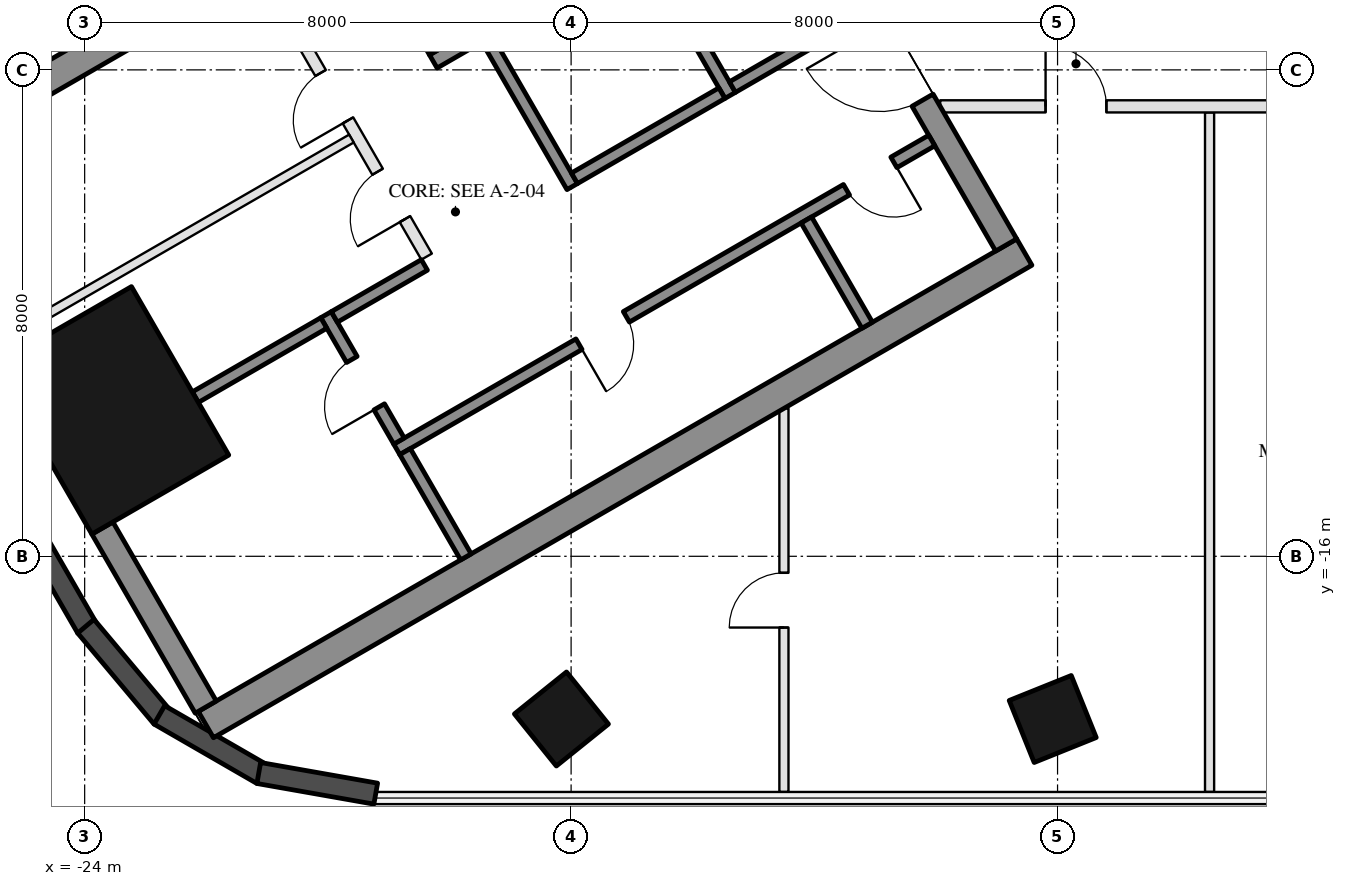
"""IFC4 building model, lengths in metres.
Left out: names, types, materials, properties, quantities, classifications, styles, units other than length and angle.
Written with IfcOpenShell. Run it as: python <this file> out.ifc"""

import sys

from ifc_helpers import new_model, si_unit, direction, frame, frame_2d, origin, origin_2d, place, context, subcontext, project, spatial, rectangle, hollow_rectangle, extrude, boolean, halfspace, element, fill, save


model = new_model("IFC4")
c1 = context("Model", 3, precision=1e-05, world=origin(), true_north=direction((0.0, 1.0)))
c2 = subcontext(c1, "Body", "Model", "MODEL_VIEW")
j1 = project(units=[si_unit("LENGTHUNIT", "METRE"), si_unit("PLANEANGLEUNIT", "RADIAN")], contexts=[c1])
p1 = place(None, origin())
s1 = spatial("IfcSite", under=j1, at=p1, CompositionType="ELEMENT")
p2 = place(p1, origin())
s2 = spatial("IfcBuilding", under=s1, at=p2, CompositionType="ELEMENT")
p3 = place(p2, frame((0.0, 0.0, 23.5)))
s3 = spatial("IfcBuildingStorey", under=s2, at=p3, CompositionType="ELEMENT", Elevation=23.5)
p4 = place(p3, frame((-16.159, -18.676, 0.0), z_axis=(0.041995221245, 0.052226075608, 0.997751892215), x_axis=(-0.999116711053, 0.000712967272, 0.042015346876)))
e1 = element("IfcColumn", 1, at=p4, inside=s3, PredefinedType="COLUMN", context=c2, shape_type="SweptSolid", body=[
    boolean("DIFFERENCE", boolean("DIFFERENCE", extrude(hollow_rectangle(XDim=1.1, YDim=1.1, WallThickness=0.05, at=origin_2d()), origin(), (0.0, 0.0, 1.0), 5.011), halfspace(frame((0.0, 0.0, 0.017), z_axis=(0.0, 0.0, 1.0), x_axis=(1.0, 0.0, 0.0)), True)), halfspace(frame((0.0, 0.0, 4.999), z_axis=(0.0, 0.0, 1.0), x_axis=(1.0, 0.0, 0.0)), False)),
])
p5 = place(p3, frame((-8.08, -18.676, 0.0), z_axis=(0.021060240181, 0.052260596004, 0.998411386348), x_axis=(-0.999778208433, 0.001085815533, 0.021032235927)))
e2 = element("IfcColumn", 2, at=p5, inside=s3, PredefinedType="COLUMN", context=c2, shape_type="SweptSolid", body=[
    boolean("DIFFERENCE", boolean("DIFFERENCE", extrude(hollow_rectangle(XDim=1.1, YDim=1.1, WallThickness=0.05, at=origin_2d()), origin(), (0.0, 0.0, 1.0), 5.008), halfspace(frame((0.0, 0.0, 0.014), z_axis=(0.0, 0.0, 1.0), x_axis=(1.0, 0.0, 0.0)), True)), halfspace(frame((0.0, 0.0, 4.997), z_axis=(0.0, 0.0, 1.0), x_axis=(1.0, 0.0, 0.0)), False)),
])
p6 = place(p3, frame((-23.556, -13.6, 0.0), z_axis=(0.0, 0.0, 1.0), x_axis=(-0.5, 0.866025403784, 0.0)))
e3 = element("IfcColumn", 3, at=p6, inside=s3, PredefinedType="COLUMN", context=c2, shape_type="SweptSolid", body=[
    extrude(hollow_rectangle(XDim=3.2, YDim=2.6, WallThickness=0.08, at=origin_2d()), origin(), (0.0, 0.0, 1.0), 5.0),
])
p7 = place(p3, frame((-26.856, -12.165, 0.0), z_axis=(0.0, 0.0, 1.0), x_axis=(0.500009758026, -0.866019769912, 0.0)))
e4 = element("IfcWall", 4, at=p7, inside=s3, PredefinedType="SOLIDWALL", context=c2, shape_type="SweptSolid", body=[
    extrude(rectangle(XDim=5.787, YDim=0.35, at=frame_2d((2.893, 0.0))), origin(), (0.0, 0.0, 1.0), 4.7),
])
for number, where, z_axis, x_axis in (
    (5, (-23.981, -17.151, 0.0), (0.0, 0.0, 1.0), (0.643, -0.766, 0.0)),
    (6, (-22.771, -18.608, 0.0), (0.0, 0.0, 1.0), (0.866, -0.5, 0.0)),
    (7, (-21.137, -19.564, 0.0), (0.0, 0.0, 1.0), (0.985, -0.174, 0.0)),
):
    element("IfcWall", number, at=place(p3, frame(where, z_axis=z_axis, x_axis=x_axis)), inside=s3, PredefinedType="SOLIDWALL", context=c2, shape_type="SweptSolid", body=[
        extrude(rectangle(XDim=1.954, YDim=0.35, at=frame_2d((0.977, 0.0))), origin(), (0.0, 0.0, 1.0), 4.7),
    ])
for number, where, z_axis, x_axis in (
    (8, (-13.797, -1.903, 0.0), (0.0, 0.0, 1.0), (-0.866, -0.5, 0.0)),
    (9, (-8.547, -10.997, 0.0), (0.0, 0.0, 1.0), (-0.866, -0.5, 0.0)),
):
    element("IfcWall", number, at=place(p3, frame(where, z_axis=z_axis, x_axis=x_axis)), inside=s3, PredefinedType="SHEAR", context=c2, shape_type="SweptSolid", body=[
        extrude(rectangle(XDim=15.542, YDim=0.5, at=frame_2d((7.771, 0.0))), origin(), (0.0, 0.0, 1.0), 4.7),
    ])
p8 = place(p3, frame((-13.845, -2.22, 0.0), z_axis=(0.0, 0.0, 1.0), x_axis=(0.500004234368, -0.866022959057, 0.0)))
e10 = element("IfcWall", 10, at=p8, inside=s3, PredefinedType="SHEAR", context=c2, shape_type="SweptSolid", body=[
    extrude(rectangle(XDim=10.0, YDim=0.4, at=frame_2d((5.0, 0.0))), origin(), (0.0, 0.0, 1.0), 4.7),
])
p9 = place(p8, frame((3.55, 0.0, 0.0)))
e11 = element("IfcOpeningElement", 11, at=p9, cuts=e10, PredefinedType="OPENING", context=c2, shape_type="SweptSolid", body=[
    extrude(rectangle(XDim=1.1, YDim=2.1, at=frame_2d((0.55, 1.05))), frame((0.0, 0.21, 0.0), z_axis=(0.0, -1.0, 0.0), x_axis=(1.0, 0.0, 0.0)), (0.0, 0.0, 1.0), 0.42),
])
p10 = place(p8, frame((5.85, 0.0, 0.0)))
e12 = element("IfcOpeningElement", 12, at=p10, cuts=e10, PredefinedType="OPENING", context=c2, shape_type="SweptSolid", body=[
    extrude(rectangle(XDim=1.4, YDim=2.1, at=frame_2d((0.7, 1.05))), frame((0.0, 0.21, 0.0), z_axis=(0.0, -1.0, 0.0), x_axis=(1.0, 0.0, 0.0)), (0.0, 0.0, 1.0), 0.42),
])
p11 = place(p3, frame((-23.708, -15.536, 0.0), z_axis=(0.0, 0.0, 1.0), x_axis=(0.500008388397, -0.866020560687, 0.0)))
e13 = element("IfcWall", 13, at=p11, inside=s3, PredefinedType="SHEAR", context=c2, shape_type="SweptSolid", body=[
    extrude(rectangle(XDim=3.4, YDim=0.4, at=frame_2d((1.7, 0.0))), origin(), (0.0, 0.0, 1.0), 4.7),
])
p12 = place(p3, frame((-12.681, -4.636, 0.0), z_axis=(0.0, 0.0, 1.0), x_axis=(-0.866021702275, -0.500006411147, 0.0)))
e14 = element("IfcWall", 14, at=p12, inside=s3, PredefinedType="SHEAR", context=c2, shape_type="SweptSolid", body=[
    extrude(rectangle(XDim=6.45, YDim=0.25, at=frame_2d((3.225, 0.0))), origin(), (0.0, 0.0, 1.0), 4.7),
])
p13 = place(p12, frame((0.3, 0.0, 0.0)))
e15 = element("IfcOpeningElement", 15, at=p13, cuts=e14, PredefinedType="OPENING", context=c2, shape_type="SweptSolid", body=[
    extrude(rectangle(XDim=1.0, YDim=2.1, at=frame_2d((0.5, 1.05))), frame((0.0, 0.135, 0.0), z_axis=(0.0, -1.0, 0.0), x_axis=(1.0, 0.0, 0.0)), (0.0, 0.0, 1.0), 0.27),
])
p14 = place(p3, frame((-19.496, -5.482, 0.0), z_axis=(0.0, 0.0, 1.0), x_axis=(0.499990435942, -0.866030925526, 0.0)))
e16 = element("IfcWall", 16, at=p14, inside=s3, PredefinedType="SHEAR", context=c2, shape_type="SweptSolid", body=[
    extrude(rectangle(XDim=2.55, YDim=0.25, at=frame_2d((1.275, 0.0))), origin(), (0.0, 0.0, 1.0), 4.7),
])
p15 = place(p3, frame((-17.381, -7.495, 0.0), z_axis=(0.0, 0.0, 1.0), x_axis=(0.500011755427, -0.866018616679, 0.0)))
e17 = element("IfcWall", 17, at=p15, inside=s3, PredefinedType="SHEAR", context=c2, shape_type="SweptSolid", body=[
    extrude(rectangle(XDim=2.8, YDim=0.2, at=frame_2d((1.4, 0.0))), origin(), (0.0, 0.0, 1.0), 4.7),
])
p16 = place(p3, frame((-14.783, -5.995, 0.0), z_axis=(0.0, 0.0, 1.0), x_axis=(0.49994636267, -0.866056369097, 0.0)))
e18 = element("IfcWall", 18, at=p16, inside=s3, PredefinedType="SHEAR", context=c2, shape_type="SweptSolid", body=[
    extrude(rectangle(XDim=2.8, YDim=0.2, at=frame_2d((1.4, 0.0))), origin(), (0.0, 0.0, 1.0), 4.7),
])
p17 = place(p16, frame((0.7, 0.0, 0.0)))
e19 = element("IfcOpeningElement", 19, at=p17, cuts=e18, PredefinedType="OPENING", context=c2, shape_type="SweptSolid", body=[
    extrude(rectangle(XDim=1.2, YDim=2.1, at=frame_2d((0.6, 1.05))), frame((0.0, 0.11, 0.0), z_axis=(0.0, -1.0, 0.0), x_axis=(1.0, 0.0, 0.0)), (0.0, 0.0, 1.0), 0.22),
])
p18 = place(p3, frame((-13.52, -8.383, 0.0), z_axis=(0.0, 0.0, 1.0), x_axis=(-0.866034573852, -0.49998411664, 0.0)))
e20 = element("IfcWall", 20, at=p18, inside=s3, PredefinedType="SHEAR", context=c2, shape_type="SweptSolid", body=[
    extrude(rectangle(XDim=2.8, YDim=0.2, at=frame_2d((1.4, 0.0))), origin(), (0.0, 0.0, 1.0), 4.7),
])
p19 = place(p3, frame((-11.268, -7.083, 0.0), z_axis=(0.0, 0.0, 1.0), x_axis=(-0.866050077142, -0.499957262057, 0.0)))
e21 = element("IfcWall", 21, at=p19, inside=s3, PredefinedType="SHEAR", context=c2, shape_type="SweptSolid", body=[
    extrude(rectangle(XDim=2.4, YDim=0.2, at=frame_2d((1.2, 0.0))), origin(), (0.0, 0.0, 1.0), 4.7),
])
p20 = place(p3, frame((-10.068, -9.162, 0.0), z_axis=(0.0, 0.0, 1.0), x_axis=(-0.866032725843, -0.499987317609, 0.0)))
e22 = element("IfcWall", 22, at=p20, inside=s3, PredefinedType="SHEAR", context=c2, shape_type="SweptSolid", body=[
    extrude(rectangle(XDim=10.16, YDim=0.2, at=frame_2d((5.08, 0.0))), origin(), (0.0, 0.0, 1.0), 4.7),
])
p21 = place(p20, frame((0.72, 0.0, 0.0)))
e23 = element("IfcOpeningElement", 23, at=p21, cuts=e22, PredefinedType="OPENING", context=c2, shape_type="SweptSolid", body=[
    extrude(rectangle(XDim=0.9, YDim=2.1, at=frame_2d((0.45, 1.05))), frame((0.0, 0.11, 0.0), z_axis=(0.0, -1.0, 0.0), x_axis=(1.0, 0.0, 0.0)), (0.0, 0.0, 1.0), 0.22),
])
p22 = place(p20, frame((5.8, 0.0, 0.0)))
e24 = element("IfcOpeningElement", 24, at=p22, cuts=e22, PredefinedType="OPENING", context=c2, shape_type="SweptSolid", body=[
    extrude(rectangle(XDim=0.9, YDim=2.1, at=frame_2d((0.45, 1.05))), frame((0.0, 0.11, 0.0), z_axis=(0.0, -1.0, 0.0), x_axis=(1.0, 0.0, 0.0)), (0.0, 0.0, 1.0), 0.22),
])
p23 = place(p3, frame((-20.031, -12.026, 0.0), z_axis=(0.0, 0.0, 1.0), x_axis=(0.500033551112, -0.866006032174, 0.0)))
e25 = element("IfcWall", 25, at=p23, inside=s3, PredefinedType="SHEAR", context=c2, shape_type="SweptSolid", body=[
    extrude(rectangle(XDim=2.4, YDim=0.2, at=frame_2d((1.2, 0.0))), origin(), (0.0, 0.0, 1.0), 4.7),
])
p24 = place(p23, frame((0.85, 0.0, 0.0)))
e26 = element("IfcOpeningElement", 26, at=p24, cuts=e25, PredefinedType="OPENING", context=c2, shape_type="SweptSolid", body=[
    extrude(rectangle(XDim=0.9, YDim=2.1, at=frame_2d((0.45, 1.05))), frame((0.0, 0.11, 0.0), z_axis=(0.0, -1.0, 0.0), x_axis=(1.0, 0.0, 0.0)), (0.0, 0.0, 1.0), 0.22),
])
p25 = place(p3, frame((-18.413, -11.208, 0.0), z_axis=(0.0, 0.0, 1.0), x_axis=(-0.866038183914, -0.499977863513, 0.0)))
e27 = element("IfcWall", 27, at=p25, inside=s3, PredefinedType="SHEAR", context=c2, shape_type="SweptSolid", body=[
    extrude(rectangle(XDim=1.71, YDim=0.2, at=frame_2d((0.855, 0.0))), origin(), (0.0, 0.0, 1.0), 4.7),
])
for number, where, z_axis, x_axis in (
    (28, (-12.131, -10.468, 0.0), (0.0, 0.0, 1.0), (0.5, -0.866, 0.0)),
    (29, (-18.73, -14.278, 0.0), (0.0, 0.0, 1.0), (0.5, -0.866, 0.0)),
):
    element("IfcWall", number, at=place(p3, frame(where, z_axis=z_axis, x_axis=x_axis)), inside=s3, PredefinedType="SHEAR", context=c2, shape_type="SweptSolid", body=[
        extrude(rectangle(XDim=2.0, YDim=0.2, at=frame_2d((1.0, 0.0))), origin(), (0.0, 0.0, 1.0), 4.7),
    ])
p26 = place(p3, frame((-20.067, -12.163, 0.0), z_axis=(0.0, 0.0, 1.0), x_axis=(-0.866048967903, -0.499959183527, 0.0)))
e30 = element("IfcWall", 30, at=p26, inside=s3, PredefinedType="SHEAR", context=c2, shape_type="SweptSolid", body=[
    extrude(rectangle(XDim=2.44, YDim=0.2, at=frame_2d((1.22, 0.0))), origin(), (0.0, 0.0, 1.0), 4.7),
])
p27 = place(p3, frame((-21.076, -6.395, 0.0), z_axis=(0.0, 0.0, 1.0), x_axis=(0.50001468107, -0.866016927499, 0.0)))
e31 = element("IfcWall", 31, at=p27, inside=s3, PredefinedType="PARTITIONING", context=c2, shape_type="SweptSolid", body=[
    extrude(rectangle(XDim=5.4, YDim=0.2, at=frame_2d((2.7, 0.0))), origin(), (0.0, 0.0, 1.0), 4.7),
])
p28 = place(p27, frame((1.913, 0.0, 0.0)))
e32 = element("IfcOpeningElement", 32, at=p28, cuts=e31, PredefinedType="OPENING", context=c2, shape_type="SweptSolid", body=[
    extrude(rectangle(XDim=0.9, YDim=2.1, at=frame_2d((0.45, 1.05))), frame((0.0, 0.11, 0.0), z_axis=(0.0, -1.0, 0.0), x_axis=(1.0, 0.0, 0.0)), (0.0, 0.0, 1.0), 0.22),
])
p29 = place(p27, frame((3.788, 0.0, 0.0)))
e33 = element("IfcOpeningElement", 33, at=p29, cuts=e31, PredefinedType="OPENING", context=c2, shape_type="SweptSolid", body=[
    extrude(rectangle(XDim=0.9, YDim=2.1, at=frame_2d((0.45, 1.05))), frame((0.0, 0.11, 0.0), z_axis=(0.0, -1.0, 0.0), x_axis=(1.0, 0.0, 0.0)), (0.0, 0.0, 1.0), 0.22),
])
p30 = place(p3, frame((-19.613, -9.13, 0.0), z_axis=(0.0, 0.0, 1.0), x_axis=(-0.866037242061, -0.499979494943, 0.0)))
e34 = element("IfcWall", 34, at=p30, inside=s3, PredefinedType="PARTITIONING", context=c2, shape_type="SweptSolid", body=[
    extrude(rectangle(XDim=6.55, YDim=0.15, at=frame_2d((3.275, 0.0))), origin(), (0.0, 0.0, 1.0), 4.7),
])
p31 = place(p3, frame((-12.5, -19.876, 0.0), z_axis=(0.0, 0.0, 1.0), x_axis=(0.0, 1.0, 0.0)))
e35 = element("IfcWall", 35, at=p31, inside=s3, PredefinedType="PARTITIONING", context=c2, shape_type="SweptSolid", body=[
    extrude(rectangle(XDim=6.308, YDim=0.15, at=frame_2d((3.154, 0.0))), origin(), (0.0, 0.0, 1.0), 4.1),
])
p32 = place(p31, frame((2.704, 0.0, 0.0)))
e36 = element("IfcOpeningElement", 36, at=p32, cuts=e35, PredefinedType="OPENING", context=c2, shape_type="SweptSolid", body=[
    extrude(rectangle(XDim=0.9, YDim=2.1, at=frame_2d((0.45, 1.05))), frame((0.0, 0.085, 0.0), z_axis=(0.0, -1.0, 0.0), x_axis=(1.0, 0.0, 0.0)), (0.0, 0.0, 1.0), 0.17),
])
p33 = place(p3, frame((-5.5, -19.876, 0.0), z_axis=(0.0, 0.0, 1.0), x_axis=(0.0, 1.0, 0.0)))
e37 = element("IfcWall", 37, at=p33, inside=s3, PredefinedType="PARTITIONING", context=c2, shape_type="SweptSolid", body=[
    extrude(rectangle(XDim=11.176, YDim=0.15, at=frame_2d((5.588, 0.0))), origin(), (0.0, 0.0, 1.0), 4.1),
])
p34 = place(p3, frame((-9.93, -8.6, 0.0), z_axis=(0.0, 0.0, 1.0), x_axis=(1.0, 0.0, 0.0)))
e38 = element("IfcWall", 38, at=p34, inside=s3, PredefinedType="PARTITIONING", context=c2, shape_type="SweptSolid", body=[
    extrude(rectangle(XDim=19.861, YDim=0.2, at=frame_2d((9.93, 0.0))), origin(), (0.0, 0.0, 1.0), 3.91),
])
p35 = place(p34, frame((1.734, 0.0, 0.0)))
e39 = element("IfcOpeningElement", 39, at=p35, cuts=e38, PredefinedType="OPENING", context=c2, shape_type="SweptSolid", body=[
    extrude(rectangle(XDim=1.0, YDim=2.1, at=frame_2d((0.5, 1.05))), frame((0.0, 0.11, 0.0), z_axis=(0.0, -1.0, 0.0), x_axis=(1.0, 0.0, 0.0)), (0.0, 0.0, 1.0), 0.22),
])
p36 = place(p34, frame((6.081, 0.0, 0.0)))
e40 = element("IfcOpeningElement", 40, at=p36, cuts=e38, PredefinedType="OPENING", context=c2, shape_type="SweptSolid", body=[
    extrude(rectangle(XDim=1.0, YDim=2.1, at=frame_2d((0.5, 1.05))), frame((0.0, 0.11, 0.0), z_axis=(0.0, -1.0, 0.0), x_axis=(1.0, 0.0, 0.0)), (0.0, 0.0, 1.0), 0.22),
])
p37 = place(p34, frame((10.831, 0.0, 0.0)))
e41 = element("IfcOpeningElement", 41, at=p37, cuts=e38, PredefinedType="OPENING", context=c2, shape_type="SweptSolid", body=[
    extrude(rectangle(XDim=1.0, YDim=2.1, at=frame_2d((0.5, 1.05))), frame((0.0, 0.11, 0.0), z_axis=(0.0, -1.0, 0.0), x_axis=(1.0, 0.0, 0.0)), (0.0, 0.0, 1.0), 0.22),
])
p38 = place(p34, frame((16.278, 0.0, 0.0)))
e42 = element("IfcOpeningElement", 42, at=p38, cuts=e38, PredefinedType="OPENING", context=c2, shape_type="SweptSolid", body=[
    extrude(rectangle(XDim=1.2, YDim=2.1, at=frame_2d((0.6, 1.05))), frame((0.0, 0.11, 0.0), z_axis=(0.0, -1.0, 0.0), x_axis=(1.0, 0.0, 0.0)), (0.0, 0.0, 1.0), 0.22),
])
p39 = place(p21, origin())
e43 = element("IfcDoor", 43, at=p39, inside=s3, OperationType="SINGLE_SWING_LEFT", PredefinedType="DOOR", context=c2, shape_type="SweptSolid", body=[
    extrude(rectangle(XDim=0.9, YDim=2.1, at=frame_2d((0.45, 1.05))), frame((0.0, 0.025, 0.0), z_axis=(0.0, -1.0, 0.0), x_axis=(1.0, 0.0, 0.0)), (0.0, 0.0, 1.0), 0.05),
])
fill(e23, e43)
p40 = place(p22, origin())
e44 = element("IfcDoor", 44, at=p40, inside=s3, OperationType="SINGLE_SWING_RIGHT", PredefinedType="DOOR", context=c2, shape_type="SweptSolid", body=[
    extrude(rectangle(XDim=0.9, YDim=2.1, at=frame_2d((0.45, 1.05))), frame((0.0, 0.025, 0.0), z_axis=(0.0, -1.0, 0.0), x_axis=(1.0, 0.0, 0.0)), (0.0, 0.0, 1.0), 0.05),
])
fill(e24, e44)
p41 = place(p24, frame((0.9, 0.0, 0.0), z_axis=(0.0, 0.0, 1.0), x_axis=(-1.0, 0.0, 0.0)))
e45 = element("IfcDoor", 45, at=p41, inside=s3, OperationType="SINGLE_SWING_LEFT", PredefinedType="DOOR", context=c2, shape_type="SweptSolid", body=[
    extrude(rectangle(XDim=0.9, YDim=2.1, at=frame_2d((0.45, 1.05))), frame((0.0, 0.025, 0.0), z_axis=(0.0, -1.0, 0.0), x_axis=(1.0, 0.0, 0.0)), (0.0, 0.0, 1.0), 0.05),
])
fill(e26, e45)
p42 = place(p28, frame((0.9, 0.0, 0.0), z_axis=(0.0, 0.0, 1.0), x_axis=(-1.0, 0.0, 0.0)))
e46 = element("IfcDoor", 46, at=p42, inside=s3, OperationType="SINGLE_SWING_LEFT", PredefinedType="DOOR", context=c2, shape_type="SweptSolid", body=[
    extrude(rectangle(XDim=0.9, YDim=2.1, at=frame_2d((0.45, 1.05))), frame((0.0, 0.025, 0.0), z_axis=(0.0, -1.0, 0.0), x_axis=(1.0, 0.0, 0.0)), (0.0, 0.0, 1.0), 0.05),
])
fill(e32, e46)
p43 = place(p29, frame((0.9, 0.0, 0.0), z_axis=(0.0, 0.0, 1.0), x_axis=(-1.0, 0.0, 0.0)))
e47 = element("IfcDoor", 47, at=p43, inside=s3, OperationType="SINGLE_SWING_LEFT", PredefinedType="DOOR", context=c2, shape_type="SweptSolid", body=[
    extrude(rectangle(XDim=0.9, YDim=2.1, at=frame_2d((0.45, 1.05))), frame((0.0, 0.025, 0.0), z_axis=(0.0, -1.0, 0.0), x_axis=(1.0, 0.0, 0.0)), (0.0, 0.0, 1.0), 0.05),
])
fill(e33, e47)
p44 = place(p10, frame((1.4, 0.0, 0.0), z_axis=(0.0, 0.0, 1.0), x_axis=(-1.0, 0.0, 0.0)))
e48 = element("IfcDoor", 48, at=p44, inside=s3, OperationType="DOUBLE_DOOR_SINGLE_SWING", PredefinedType="DOOR", context=c2, shape_type="SweptSolid", body=[
    extrude(rectangle(XDim=1.4, YDim=2.1, at=frame_2d((0.7, 1.05))), frame((0.0, 0.025, 0.0), z_axis=(0.0, -1.0, 0.0), x_axis=(1.0, 0.0, 0.0)), (0.0, 0.0, 1.0), 0.05),
])
fill(e12, e48)
p45 = place(p35, origin())
e49 = element("IfcDoor", 49, at=p45, inside=s3, OperationType="SINGLE_SWING_LEFT", PredefinedType="DOOR", context=c2, shape_type="SweptSolid", body=[
    extrude(rectangle(XDim=1.0, YDim=2.1, at=frame_2d((0.5, 1.05))), frame((0.0, 0.025, 0.0), z_axis=(0.0, -1.0, 0.0), x_axis=(1.0, 0.0, 0.0)), (0.0, 0.0, 1.0), 0.05),
])
fill(e39, e49)
p46 = place(p32, origin())
e50 = element("IfcDoor", 50, at=p46, inside=s3, OperationType="SINGLE_SWING_LEFT", PredefinedType="DOOR", context=c2, shape_type="SweptSolid", body=[
    extrude(rectangle(XDim=0.9, YDim=2.1, at=frame_2d((0.45, 1.05))), frame((0.0, 0.025, 0.0), z_axis=(0.0, -1.0, 0.0), x_axis=(1.0, 0.0, 0.0)), (0.0, 0.0, 1.0), 0.05),
])
fill(e36, e50)
save(model, sys.argv[1])
